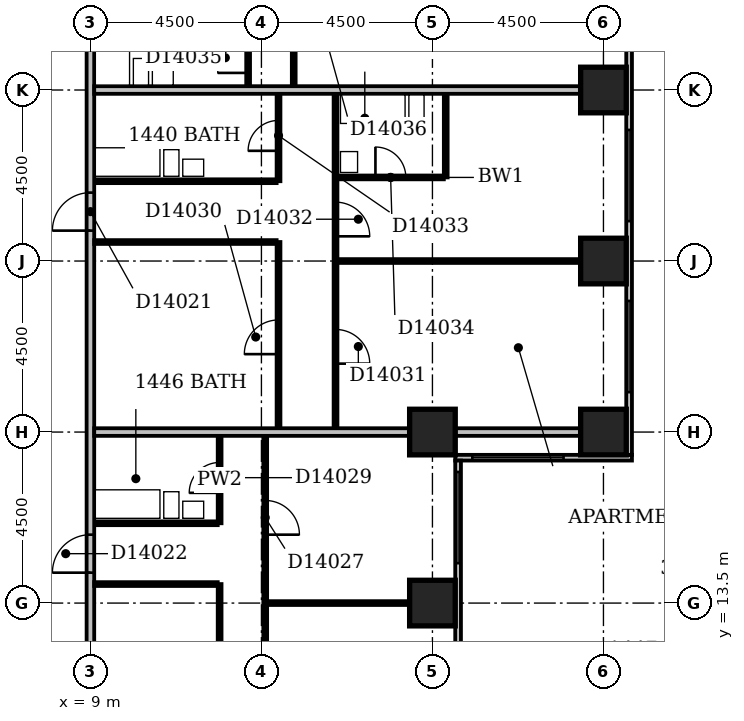
"""IFC4 building model, lengths in metres.
Left out: names, types, materials, properties, quantities, classifications, styles, units other than length and angle.
Written with IfcOpenShell. Run it as: python <this file> out.ifc"""

import sys

from ifc_helpers import new_model, si_unit, direction, frame, frame_2d, origin, origin_2d, place, context, subcontext, project, spatial, rectangle, extrude, element, fill, save


model = new_model("IFC4")
c1 = context("Model", 3, precision=1e-05, world=origin(), true_north=direction((0.0, 1.0)))
c2 = subcontext(c1, "Body", "Model", "MODEL_VIEW")
j1 = project(units=[si_unit("LENGTHUNIT", "METRE"), si_unit("PLANEANGLEUNIT", "RADIAN")], contexts=[c1])
p1 = place(None, origin())
s1 = spatial("IfcSite", under=j1, at=p1, CompositionType="ELEMENT")
p2 = place(p1, origin())
s2 = spatial("IfcBuilding", under=s1, at=p2, CompositionType="ELEMENT")
p3 = place(p2, frame((0.0, 0.0, 61.4)))
s3 = spatial("IfcBuildingStorey", under=s2, at=p3, CompositionType="ELEMENT", Elevation=61.4)
for number, where, z_axis, x_axis in (
    (1, (18.0, 13.5, -0.3), (0.0, 0.0, 1.0), (1.0, 0.0, 0.0)),
    (2, (18.0, 18.0, -0.3), (0.0, 0.0, 1.0), (1.0, 0.0, 0.0)),
    (3, (22.5, 18.0, -0.3), (0.0, 0.0, 1.0), (1.0, 0.0, 0.0)),
    (4, (22.5, 22.5, -0.3), (0.0, 0.0, 1.0), (1.0, 0.0, 0.0)),
    (5, (22.5, 27.0, -0.3), (0.0, 0.0, 1.0), (1.0, 0.0, 0.0)),
):
    element("IfcColumn", number, at=place(p3, frame(where, z_axis=z_axis, x_axis=x_axis)), inside=s3, PredefinedType="COLUMN", context=c2, shape_type="SweptSolid", body=[
        extrude(rectangle(XDim=1.2, YDim=1.2, at=origin_2d()), origin(), (0.0, 0.0, 1.0), 3.6),
    ])
p4 = place(p3, frame((18.675, 8.4, 0.0), z_axis=(0.0, 0.0, 1.0), x_axis=(0.0, 1.0, 0.0)))
e6 = element("IfcWall", 6, at=p4, inside=s3, PredefinedType="STANDARD", context=c2, shape_type="SweptSolid", body=[
    extrude(rectangle(XDim=8.85, YDim=0.15, at=frame_2d((4.425, 0.0))), origin(), (0.0, 0.0, 1.0), 2.7),
])
p5 = place(p4, frame((1.65, 0.0, 0.6)))
e7 = element("IfcOpeningElement", 7, at=p5, cuts=e6, PredefinedType="OPENING", context=c2, shape_type="SweptSolid", body=[
    extrude(rectangle(XDim=2.4, YDim=1.8, at=frame_2d((1.2, 0.9))), frame((0.0, 0.087, 0.0), z_axis=(0.0, -1.0, 0.0), x_axis=(1.0, 0.0, 0.0)), (0.0, 0.0, 1.0), 0.174),
])
p6 = place(p4, frame((6.15, 0.0, 0.6)))
e8 = element("IfcOpeningElement", 8, at=p6, cuts=e6, PredefinedType="OPENING", context=c2, shape_type="SweptSolid", body=[
    extrude(rectangle(XDim=2.4, YDim=1.8, at=frame_2d((1.2, 0.9))), frame((0.0, 0.087, 0.0), z_axis=(0.0, -1.0, 0.0), x_axis=(1.0, 0.0, 0.0)), (0.0, 0.0, 1.0), 0.174),
])
p7 = place(p3, frame((18.6, 17.325, 0.0), z_axis=(0.0, 0.0, 1.0), x_axis=(1.0, 0.0, 0.0)))
e9 = element("IfcWall", 9, at=p7, inside=s3, PredefinedType="STANDARD", context=c2, shape_type="SweptSolid", body=[
    extrude(rectangle(XDim=4.65, YDim=0.15, at=frame_2d((2.325, 0.0))), origin(), (0.0, 0.0, 1.0), 2.7),
])
p8 = place(p7, frame((0.45, 0.0, 0.6)))
e10 = element("IfcOpeningElement", 10, at=p8, cuts=e9, PredefinedType="OPENING", context=c2, shape_type="SweptSolid", body=[
    extrude(rectangle(XDim=2.4, YDim=1.8, at=frame_2d((1.2, 0.9))), frame((0.0, 0.087, 0.0), z_axis=(0.0, -1.0, 0.0), x_axis=(1.0, 0.0, 0.0)), (0.0, 0.0, 1.0), 0.174),
])
p9 = place(p3, frame((23.175, 17.4, 0.0), z_axis=(0.0, 0.0, 1.0), x_axis=(0.0, 1.0, 0.0)))
e11 = element("IfcWall", 11, at=p9, inside=s3, PredefinedType="STANDARD", context=c2, shape_type="SweptSolid", body=[
    extrude(rectangle(XDim=17.85, YDim=0.15, at=frame_2d((8.925, 0.0))), origin(), (0.0, 0.0, 1.0), 2.7),
])
p10 = place(p9, frame((1.65, 0.0, 0.6)))
e12 = element("IfcOpeningElement", 12, at=p10, cuts=e11, PredefinedType="OPENING", context=c2, shape_type="SweptSolid", body=[
    extrude(rectangle(XDim=2.4, YDim=1.8, at=frame_2d((1.2, 0.9))), frame((0.0, 0.087, 0.0), z_axis=(0.0, -1.0, 0.0), x_axis=(1.0, 0.0, 0.0)), (0.0, 0.0, 1.0), 0.174),
])
p11 = place(p9, frame((6.15, 0.0, 0.6)))
e13 = element("IfcOpeningElement", 13, at=p11, cuts=e11, PredefinedType="OPENING", context=c2, shape_type="SweptSolid", body=[
    extrude(rectangle(XDim=2.4, YDim=1.8, at=frame_2d((1.2, 0.9))), frame((0.0, 0.087, 0.0), z_axis=(0.0, -1.0, 0.0), x_axis=(1.0, 0.0, 0.0)), (0.0, 0.0, 1.0), 0.174),
])
p12 = place(p9, frame((11.961, 0.0, 0.6)))
e14 = element("IfcOpeningElement", 14, at=p12, cuts=e11, PredefinedType="OPENING", context=c2, shape_type="SweptSolid", body=[
    extrude(rectangle(XDim=1.2, YDim=1.8, at=frame_2d((0.6, 0.9))), frame((0.0, 0.087, 0.0), z_axis=(0.0, -1.0, 0.0), x_axis=(1.0, 0.0, 0.0)), (0.0, 0.0, 1.0), 0.174),
])
p13 = place(p9, frame((15.15, 0.0, 0.6)))
e15 = element("IfcOpeningElement", 15, at=p13, cuts=e11, PredefinedType="OPENING", context=c2, shape_type="SweptSolid", body=[
    extrude(rectangle(XDim=2.4, YDim=1.8, at=frame_2d((1.2, 0.9))), frame((0.0, 0.087, 0.0), z_axis=(0.0, -1.0, 0.0), x_axis=(1.0, 0.0, 0.0)), (0.0, 0.0, 1.0), 0.174),
])
p14 = place(p3, frame((9.0, 5.0, 0.0), z_axis=(0.0, 0.0, 1.0), x_axis=(0.0, 1.0, 0.0)))
e16 = element("IfcWall", 16, at=p14, inside=s3, PredefinedType="PARTITIONING", context=c2, shape_type="SweptSolid", body=[
    extrude(rectangle(XDim=44.5, YDim=0.2, at=frame_2d((22.25, 0.0))), origin(), (0.0, 0.0, 1.0), 3.3),
])
p15 = place(p14, frame((28.05, 0.0, 0.0)))
e17 = element("IfcOpeningElement", 17, at=p15, cuts=e16, PredefinedType="OPENING", context=c2, shape_type="SweptSolid", body=[
    extrude(rectangle(XDim=1.0, YDim=2.1, at=frame_2d((0.5, 1.05))), frame((0.0, 0.112, 0.0), z_axis=(0.0, -1.0, 0.0), x_axis=(1.0, 0.0, 0.0)), (0.0, 0.0, 1.0), 0.224),
])
p16 = place(p14, frame((23.95, 0.0, 0.0)))
e18 = element("IfcOpeningElement", 18, at=p16, cuts=e16, PredefinedType="OPENING", context=c2, shape_type="SweptSolid", body=[
    extrude(rectangle(XDim=1.0, YDim=2.1, at=frame_2d((0.5, 1.05))), frame((0.0, 0.112, 0.0), z_axis=(0.0, -1.0, 0.0), x_axis=(1.0, 0.0, 0.0)), (0.0, 0.0, 1.0), 0.224),
])
p17 = place(p14, frame((18.3, 0.0, 0.0)))
e19 = element("IfcOpeningElement", 19, at=p17, cuts=e16, PredefinedType="OPENING", context=c2, shape_type="SweptSolid", body=[
    extrude(rectangle(XDim=1.0, YDim=2.1, at=frame_2d((0.5, 1.05))), frame((0.0, 0.112, 0.0), z_axis=(0.0, -1.0, 0.0), x_axis=(1.0, 0.0, 0.0)), (0.0, 0.0, 1.0), 0.224),
])
p18 = place(p14, frame((9.3, 0.0, 0.0)))
e20 = element("IfcOpeningElement", 20, at=p18, cuts=e16, PredefinedType="OPENING", context=c2, shape_type="SweptSolid", body=[
    extrude(rectangle(XDim=1.0, YDim=2.1, at=frame_2d((0.5, 1.05))), frame((0.0, 0.112, 0.0), z_axis=(0.0, -1.0, 0.0), x_axis=(1.0, 0.0, 0.0)), (0.0, 0.0, 1.0), 0.224),
])
p19 = place(p14, frame((32.75, 0.0, 0.0)))
e21 = element("IfcOpeningElement", 21, at=p19, cuts=e16, PredefinedType="OPENING", context=c2, shape_type="SweptSolid", body=[
    extrude(rectangle(XDim=0.9, YDim=2.1, at=frame_2d((0.45, 1.05))), frame((0.0, 0.112, 0.0), z_axis=(0.0, -1.0, 0.0), x_axis=(1.0, 0.0, 0.0)), (0.0, 0.0, 1.0), 0.224),
])
p20 = place(p14, frame((1.5, 0.0, 0.0)))
e22 = element("IfcOpeningElement", 22, at=p20, cuts=e16, PredefinedType="OPENING", context=c2, shape_type="SweptSolid", body=[
    extrude(rectangle(XDim=0.9, YDim=2.1, at=frame_2d((0.45, 1.05))), frame((0.0, 0.112, 0.0), z_axis=(0.0, -1.0, 0.0), x_axis=(1.0, 0.0, 0.0)), (0.0, 0.0, 1.0), 0.224),
])
p21 = place(p3, frame((12.4, 9.1, 0.0), z_axis=(0.0, 0.0, 1.0), x_axis=(0.0, 1.0, 0.0)))
e23 = element("IfcWall", 23, at=p21, inside=s3, PredefinedType="PARTITIONING", context=c2, shape_type="SweptSolid", body=[
    extrude(rectangle(XDim=4.9, YDim=0.1, at=frame_2d((2.45, 0.0))), origin(), (0.0, 0.0, 1.0), 3.3),
])
p22 = place(p21, frame((1.95, 0.0, 0.0)))
e24 = element("IfcOpeningElement", 24, at=p22, cuts=e23, PredefinedType="OPENING", context=c2, shape_type="SweptSolid", body=[
    extrude(rectangle(XDim=0.9, YDim=2.1, at=frame_2d((0.45, 1.05))), frame((0.0, 0.062, 0.0), z_axis=(0.0, -1.0, 0.0), x_axis=(1.0, 0.0, 0.0)), (0.0, 0.0, 1.0), 0.124),
])
p23 = place(p3, frame((13.6, 9.6, 0.0), z_axis=(0.0, 0.0, 1.0), x_axis=(0.0, 1.0, 0.0)))
e25 = element("IfcWall", 25, at=p23, inside=s3, PredefinedType="PARTITIONING", context=c2, shape_type="SweptSolid", body=[
    extrude(rectangle(XDim=8.3, YDim=0.1, at=frame_2d((4.15, 0.0))), origin(), (0.0, 0.0, 1.0), 3.3),
])
p24 = place(p23, frame((1.2, 0.0, 0.0)))
e26 = element("IfcOpeningElement", 26, at=p24, cuts=e25, PredefinedType="OPENING", context=c2, shape_type="SweptSolid", body=[
    extrude(rectangle(XDim=0.9, YDim=2.1, at=frame_2d((0.45, 1.05))), frame((0.0, 0.062, 0.0), z_axis=(0.0, -1.0, 0.0), x_axis=(1.0, 0.0, 0.0)), (0.0, 0.0, 1.0), 0.124),
])
p25 = place(p23, frame((5.7, 0.0, 0.0)))
e27 = element("IfcOpeningElement", 27, at=p25, cuts=e25, PredefinedType="OPENING", context=c2, shape_type="SweptSolid", body=[
    extrude(rectangle(XDim=0.9, YDim=2.1, at=frame_2d((0.45, 1.05))), frame((0.0, 0.062, 0.0), z_axis=(0.0, -1.0, 0.0), x_axis=(1.0, 0.0, 0.0)), (0.0, 0.0, 1.0), 0.124),
])
p26 = place(p3, frame((13.65, 13.5, 0.0), z_axis=(0.0, 0.0, 1.0), x_axis=(1.0, 0.0, 0.0)))
e28 = element("IfcWall", 28, at=p26, inside=s3, PredefinedType="PARTITIONING", context=c2, shape_type="SweptSolid", body=[
    extrude(rectangle(XDim=3.75, YDim=0.1, at=frame_2d((1.875, 0.0))), origin(), (0.0, 0.0, 1.0), 3.3),
])
p27 = place(p3, frame((9.1, 14.0, 0.0), z_axis=(0.0, 0.0, 1.0), x_axis=(1.0, 0.0, 0.0)))
e29 = element("IfcWall", 29, at=p27, inside=s3, PredefinedType="PARTITIONING", context=c2, shape_type="SweptSolid", body=[
    extrude(rectangle(XDim=3.25, YDim=0.1, at=frame_2d((1.625, 0.0))), origin(), (0.0, 0.0, 1.0), 3.3),
])
p28 = place(p3, frame((9.1, 15.6, 0.0), z_axis=(0.0, 0.0, 1.0), x_axis=(1.0, 0.0, 0.0)))
e30 = element("IfcWall", 30, at=p28, inside=s3, PredefinedType="PLUMBINGWALL", context=c2, shape_type="SweptSolid", body=[
    extrude(rectangle(XDim=3.25, YDim=0.1, at=frame_2d((1.625, 0.0))), origin(), (0.0, 0.0, 1.0), 3.3),
])
p29 = place(p3, frame((12.4, 15.6, 0.0), z_axis=(0.0, 0.0, 1.0), x_axis=(0.0, 1.0, 0.0)))
e31 = element("IfcWall", 31, at=p29, inside=s3, PredefinedType="PARTITIONING", context=c2, shape_type="SweptSolid", body=[
    extrude(rectangle(XDim=2.3, YDim=0.1, at=frame_2d((1.15, 0.0))), origin(), (0.0, 0.0, 1.0), 3.3),
])
p30 = place(p29, frame((0.8, 0.0, 0.0)))
e32 = element("IfcOpeningElement", 32, at=p30, cuts=e31, PredefinedType="OPENING", context=c2, shape_type="SweptSolid", body=[
    extrude(rectangle(XDim=0.8, YDim=2.1, at=frame_2d((0.4, 1.05))), frame((0.0, 0.062, 0.0), z_axis=(0.0, -1.0, 0.0), x_axis=(1.0, 0.0, 0.0)), (0.0, 0.0, 1.0), 0.124),
])
p31 = place(p3, frame((9.1, 18.0, 0.0), z_axis=(0.0, 0.0, 1.0), x_axis=(1.0, 0.0, 0.0)))
e33 = element("IfcWall", 33, at=p31, inside=s3, PredefinedType="PARTITIONING", context=c2, shape_type="SweptSolid", body=[
    extrude(rectangle(XDim=8.3, YDim=0.2, at=frame_2d((4.15, 0.0))), origin(), (0.0, 0.0, 1.0), 2.6),
])
p32 = place(p3, frame((18.6, 18.0, 0.0), z_axis=(0.0, 0.0, 1.0), x_axis=(1.0, 0.0, 0.0)))
e34 = element("IfcWall", 34, at=p32, inside=s3, PredefinedType="PARTITIONING", context=c2, shape_type="SweptSolid", body=[
    extrude(rectangle(XDim=3.3, YDim=0.2, at=frame_2d((1.65, 0.0))), origin(), (0.0, 0.0, 1.0), 2.7),
])
p33 = place(p3, frame((13.95, 18.1, 0.0), z_axis=(0.0, 0.0, 1.0), x_axis=(0.0, 1.0, 0.0)))
e35 = element("IfcWall", 35, at=p33, inside=s3, PredefinedType="PARTITIONING", context=c2, shape_type="SweptSolid", body=[
    extrude(rectangle(XDim=4.9, YDim=0.1, at=frame_2d((2.45, 0.0))), origin(), (0.0, 0.0, 1.0), 3.3),
])
p34 = place(p33, frame((1.95, 0.0, 0.0)))
e36 = element("IfcOpeningElement", 36, at=p34, cuts=e35, PredefinedType="OPENING", context=c2, shape_type="SweptSolid", body=[
    extrude(rectangle(XDim=0.9, YDim=2.1, at=frame_2d((0.45, 1.05))), frame((0.0, 0.062, 0.0), z_axis=(0.0, -1.0, 0.0), x_axis=(1.0, 0.0, 0.0)), (0.0, 0.0, 1.0), 0.124),
])
p35 = place(p3, frame((15.45, 18.1, 0.0), z_axis=(0.0, 0.0, 1.0), x_axis=(0.0, 1.0, 0.0)))
e37 = element("IfcWall", 37, at=p35, inside=s3, PredefinedType="PARTITIONING", context=c2, shape_type="SweptSolid", body=[
    extrude(rectangle(XDim=8.8, YDim=0.1, at=frame_2d((4.4, 0.0))), origin(), (0.0, 0.0, 1.0), 3.3),
])
p36 = place(p35, frame((1.7, 0.0, 0.0)))
e38 = element("IfcOpeningElement", 38, at=p36, cuts=e37, PredefinedType="OPENING", context=c2, shape_type="SweptSolid", body=[
    extrude(rectangle(XDim=0.9, YDim=2.1, at=frame_2d((0.45, 1.05))), frame((0.0, 0.062, 0.0), z_axis=(0.0, -1.0, 0.0), x_axis=(1.0, 0.0, 0.0)), (0.0, 0.0, 1.0), 0.124),
])
p37 = place(p35, frame((5.05, 0.0, 0.0)))
e39 = element("IfcOpeningElement", 39, at=p37, cuts=e37, PredefinedType="OPENING", context=c2, shape_type="SweptSolid", body=[
    extrude(rectangle(XDim=0.9, YDim=2.1, at=frame_2d((0.45, 1.05))), frame((0.0, 0.062, 0.0), z_axis=(0.0, -1.0, 0.0), x_axis=(1.0, 0.0, 0.0)), (0.0, 0.0, 1.0), 0.124),
])
p38 = place(p3, frame((15.5, 22.5, 0.0), z_axis=(0.0, 0.0, 1.0), x_axis=(1.0, 0.0, 0.0)))
e40 = element("IfcWall", 40, at=p38, inside=s3, PredefinedType="PARTITIONING", context=c2, shape_type="SweptSolid", body=[
    extrude(rectangle(XDim=6.4, YDim=0.1, at=frame_2d((3.2, 0.0))), origin(), (0.0, 0.0, 1.0), 3.3),
])
p39 = place(p3, frame((9.1, 23.0, 0.0), z_axis=(0.0, 0.0, 1.0), x_axis=(1.0, 0.0, 0.0)))
e41 = element("IfcWall", 41, at=p39, inside=s3, PredefinedType="PARTITIONING", context=c2, shape_type="SweptSolid", body=[
    extrude(rectangle(XDim=4.8, YDim=0.1, at=frame_2d((2.4, 0.0))), origin(), (0.0, 0.0, 1.0), 3.3),
])
p40 = place(p3, frame((9.1, 24.6, 0.0), z_axis=(0.0, 0.0, 1.0), x_axis=(1.0, 0.0, 0.0)))
e42 = element("IfcWall", 42, at=p40, inside=s3, PredefinedType="PLUMBINGWALL", context=c2, shape_type="SweptSolid", body=[
    extrude(rectangle(XDim=4.8, YDim=0.1, at=frame_2d((2.4, 0.0))), origin(), (0.0, 0.0, 1.0), 3.3),
])
p41 = place(p3, frame((13.95, 24.6, 0.0), z_axis=(0.0, 0.0, 1.0), x_axis=(0.0, 1.0, 0.0)))
e43 = element("IfcWall", 43, at=p41, inside=s3, PredefinedType="PARTITIONING", context=c2, shape_type="SweptSolid", body=[
    extrude(rectangle(XDim=2.3, YDim=0.1, at=frame_2d((1.15, 0.0))), origin(), (0.0, 0.0, 1.0), 3.3),
])
p42 = place(p41, frame((0.8, 0.0, 0.0)))
e44 = element("IfcOpeningElement", 44, at=p42, cuts=e43, PredefinedType="OPENING", context=c2, shape_type="SweptSolid", body=[
    extrude(rectangle(XDim=0.8, YDim=2.1, at=frame_2d((0.4, 1.05))), frame((0.0, 0.062, 0.0), z_axis=(0.0, -1.0, 0.0), x_axis=(1.0, 0.0, 0.0)), (0.0, 0.0, 1.0), 0.124),
])
p43 = place(p3, frame((15.5, 24.7, 0.0), z_axis=(0.0, 0.0, 1.0), x_axis=(1.0, 0.0, 0.0)))
e45 = element("IfcWall", 45, at=p43, inside=s3, PredefinedType="PLUMBINGWALL", context=c2, shape_type="SweptSolid", body=[
    extrude(rectangle(XDim=2.8, YDim=0.1, at=frame_2d((1.4, 0.0))), origin(), (0.0, 0.0, 1.0), 3.3),
])
p44 = place(p43, frame((1.0, 0.0, 0.0)))
e46 = element("IfcOpeningElement", 46, at=p44, cuts=e45, PredefinedType="OPENING", context=c2, shape_type="SweptSolid", body=[
    extrude(rectangle(XDim=0.8, YDim=2.1, at=frame_2d((0.4, 1.05))), frame((0.0, 0.062, 0.0), z_axis=(0.0, -1.0, 0.0), x_axis=(1.0, 0.0, 0.0)), (0.0, 0.0, 1.0), 0.124),
])
p45 = place(p3, frame((18.35, 24.7, 0.0), z_axis=(0.0, 0.0, 1.0), x_axis=(0.0, 1.0, 0.0)))
e47 = element("IfcWall", 47, at=p45, inside=s3, PredefinedType="PLUMBINGWALL", context=c2, shape_type="SweptSolid", body=[
    extrude(rectangle(XDim=2.2, YDim=0.1, at=frame_2d((1.1, 0.0))), origin(), (0.0, 0.0, 1.0), 3.3),
])
p46 = place(p3, frame((9.1, 27.0, 0.0), z_axis=(0.0, 0.0, 1.0), x_axis=(1.0, 0.0, 0.0)))
e48 = element("IfcWall", 48, at=p46, inside=s3, PredefinedType="PARTITIONING", context=c2, shape_type="SweptSolid", body=[
    extrude(rectangle(XDim=12.8, YDim=0.2, at=frame_2d((6.4, 0.0))), origin(), (0.0, 0.0, 1.0), 2.7),
])
p47 = place(p3, frame((13.15, 27.1, 0.0), z_axis=(0.0, 0.0, 1.0), x_axis=(0.0, 1.0, 0.0)))
e49 = element("IfcWall", 49, at=p47, inside=s3, PredefinedType="PARTITIONING", context=c2, shape_type="SweptSolid", body=[
    extrude(rectangle(XDim=1.6, YDim=0.1, at=frame_2d((0.8, 0.0))), origin(), (0.0, 0.0, 1.0), 3.3),
])
p48 = place(p47, frame((0.35, 0.0, 0.0)))
e50 = element("IfcOpeningElement", 50, at=p48, cuts=e49, PredefinedType="OPENING", context=c2, shape_type="SweptSolid", body=[
    extrude(rectangle(XDim=0.8, YDim=2.1, at=frame_2d((0.4, 1.05))), frame((0.0, 0.062, 0.0), z_axis=(0.0, -1.0, 0.0), x_axis=(1.0, 0.0, 0.0)), (0.0, 0.0, 1.0), 0.124),
])
p49 = place(p3, frame((14.35, 27.1, 0.0), z_axis=(0.0, 0.0, 1.0), x_axis=(0.0, 1.0, 0.0)))
e51 = element("IfcWall", 51, at=p49, inside=s3, PredefinedType="PARTITIONING", context=c2, shape_type="SweptSolid", body=[
    extrude(rectangle(XDim=4.3, YDim=0.1, at=frame_2d((2.15, 0.0))), origin(), (0.0, 0.0, 1.0), 3.3),
])
p50 = place(p49, frame((1.7, 0.0, 0.0)))
e52 = element("IfcOpeningElement", 52, at=p50, cuts=e51, PredefinedType="OPENING", context=c2, shape_type="SweptSolid", body=[
    extrude(rectangle(XDim=0.9, YDim=2.1, at=frame_2d((0.45, 1.05))), frame((0.0, 0.062, 0.0), z_axis=(0.0, -1.0, 0.0), x_axis=(1.0, 0.0, 0.0)), (0.0, 0.0, 1.0), 0.124),
])
p51 = place(p6, origin())
e53 = element("IfcWindow", 53, at=p51, inside=s3, PartitioningType="SINGLE_PANEL", PredefinedType="WINDOW", context=c2, shape_type="SweptSolid", body=[
    extrude(rectangle(XDim=2.4, YDim=1.8, at=frame_2d((1.2, 0.9))), frame((0.0, 0.03, 0.0), z_axis=(0.0, -1.0, 0.0), x_axis=(1.0, 0.0, 0.0)), (0.0, 0.0, 1.0), 0.06),
])
fill(e8, e53)
p52 = place(p8, origin())
e54 = element("IfcWindow", 54, at=p52, inside=s3, PartitioningType="SINGLE_PANEL", PredefinedType="WINDOW", context=c2, shape_type="SweptSolid", body=[
    extrude(rectangle(XDim=2.4, YDim=1.8, at=frame_2d((1.2, 0.9))), frame((0.0, 0.03, 0.0), z_axis=(0.0, -1.0, 0.0), x_axis=(1.0, 0.0, 0.0)), (0.0, 0.0, 1.0), 0.06),
])
fill(e10, e54)
p53 = place(p10, origin())
e55 = element("IfcWindow", 55, at=p53, inside=s3, PartitioningType="SINGLE_PANEL", PredefinedType="WINDOW", context=c2, shape_type="SweptSolid", body=[
    extrude(rectangle(XDim=2.4, YDim=1.8, at=frame_2d((1.2, 0.9))), frame((0.0, 0.03, 0.0), z_axis=(0.0, -1.0, 0.0), x_axis=(1.0, 0.0, 0.0)), (0.0, 0.0, 1.0), 0.06),
])
fill(e12, e55)
p54 = place(p11, origin())
e56 = element("IfcWindow", 56, at=p54, inside=s3, PartitioningType="SINGLE_PANEL", PredefinedType="WINDOW", context=c2, shape_type="SweptSolid", body=[
    extrude(rectangle(XDim=2.4, YDim=1.8, at=frame_2d((1.2, 0.9))), frame((0.0, 0.03, 0.0), z_axis=(0.0, -1.0, 0.0), x_axis=(1.0, 0.0, 0.0)), (0.0, 0.0, 1.0), 0.06),
])
fill(e13, e56)
p55 = place(p17, origin())
e57 = element("IfcDoor", 57, at=p55, inside=s3, OperationType="SINGLE_SWING_LEFT", PredefinedType="DOOR", context=c2, shape_type="SweptSolid", body=[
    extrude(rectangle(XDim=1.0, YDim=2.1, at=frame_2d((0.5, 1.05))), frame((0.0, 0.025, 0.0), z_axis=(0.0, -1.0, 0.0), x_axis=(1.0, 0.0, 0.0)), (0.0, 0.0, 1.0), 0.05),
])
fill(e19, e57)
p56 = place(p18, origin())
e58 = element("IfcDoor", 58, at=p56, inside=s3, OperationType="SINGLE_SWING_LEFT", PredefinedType="DOOR", context=c2, shape_type="SweptSolid", body=[
    extrude(rectangle(XDim=1.0, YDim=2.1, at=frame_2d((0.5, 1.05))), frame((0.0, 0.025, 0.0), z_axis=(0.0, -1.0, 0.0), x_axis=(1.0, 0.0, 0.0)), (0.0, 0.0, 1.0), 0.05),
])
fill(e20, e58)
p57 = place(p25, frame((0.9, 0.0, 0.0), z_axis=(0.0, 0.0, 1.0), x_axis=(-1.0, 0.0, 0.0)))
e59 = element("IfcDoor", 59, at=p57, inside=s3, OperationType="SINGLE_SWING_RIGHT", PredefinedType="DOOR", context=c2, shape_type="SweptSolid", body=[
    extrude(rectangle(XDim=0.9, YDim=2.1, at=frame_2d((0.45, 1.05))), frame((0.0, 0.025, 0.0), z_axis=(0.0, -1.0, 0.0), x_axis=(1.0, 0.0, 0.0)), (0.0, 0.0, 1.0), 0.05),
])
fill(e27, e59)
p58 = place(p30, origin())
e60 = element("IfcDoor", 60, at=p58, inside=s3, OperationType="SINGLE_SWING_LEFT", PredefinedType="DOOR", context=c2, shape_type="SweptSolid", body=[
    extrude(rectangle(XDim=0.8, YDim=2.1, at=frame_2d((0.4, 1.05))), frame((0.0, 0.025, 0.0), z_axis=(0.0, -1.0, 0.0), x_axis=(1.0, 0.0, 0.0)), (0.0, 0.0, 1.0), 0.05),
])
fill(e32, e60)
p59 = place(p34, origin())
e61 = element("IfcDoor", 61, at=p59, inside=s3, OperationType="SINGLE_SWING_LEFT", PredefinedType="DOOR", context=c2, shape_type="SweptSolid", body=[
    extrude(rectangle(XDim=0.9, YDim=2.1, at=frame_2d((0.45, 1.05))), frame((0.0, 0.025, 0.0), z_axis=(0.0, -1.0, 0.0), x_axis=(1.0, 0.0, 0.0)), (0.0, 0.0, 1.0), 0.05),
])
fill(e36, e61)
p60 = place(p36, frame((0.9, 0.0, 0.0), z_axis=(0.0, 0.0, 1.0), x_axis=(-1.0, 0.0, 0.0)))
e62 = element("IfcDoor", 62, at=p60, inside=s3, OperationType="SINGLE_SWING_RIGHT", PredefinedType="DOOR", context=c2, shape_type="SweptSolid", body=[
    extrude(rectangle(XDim=0.9, YDim=2.1, at=frame_2d((0.45, 1.05))), frame((0.0, 0.025, 0.0), z_axis=(0.0, -1.0, 0.0), x_axis=(1.0, 0.0, 0.0)), (0.0, 0.0, 1.0), 0.05),
])
fill(e38, e62)
p61 = place(p37, frame((0.9, 0.0, 0.0), z_axis=(0.0, 0.0, 1.0), x_axis=(-1.0, 0.0, 0.0)))
e63 = element("IfcDoor", 63, at=p61, inside=s3, OperationType="SINGLE_SWING_RIGHT", PredefinedType="DOOR", context=c2, shape_type="SweptSolid", body=[
    extrude(rectangle(XDim=0.9, YDim=2.1, at=frame_2d((0.45, 1.05))), frame((0.0, 0.025, 0.0), z_axis=(0.0, -1.0, 0.0), x_axis=(1.0, 0.0, 0.0)), (0.0, 0.0, 1.0), 0.05),
])
fill(e39, e63)
p62 = place(p42, origin())
e64 = element("IfcDoor", 64, at=p62, inside=s3, OperationType="SINGLE_SWING_LEFT", PredefinedType="DOOR", context=c2, shape_type="SweptSolid", body=[
    extrude(rectangle(XDim=0.8, YDim=2.1, at=frame_2d((0.4, 1.05))), frame((0.0, 0.025, 0.0), z_axis=(0.0, -1.0, 0.0), x_axis=(1.0, 0.0, 0.0)), (0.0, 0.0, 1.0), 0.05),
])
fill(e44, e64)
p63 = place(p44, origin())
e65 = element("IfcDoor", 65, at=p63, inside=s3, OperationType="SINGLE_SWING_LEFT", PredefinedType="DOOR", context=c2, shape_type="SweptSolid", body=[
    extrude(rectangle(XDim=0.8, YDim=2.1, at=frame_2d((0.4, 1.05))), frame((0.0, 0.025, 0.0), z_axis=(0.0, -1.0, 0.0), x_axis=(1.0, 0.0, 0.0)), (0.0, 0.0, 1.0), 0.05),
])
fill(e46, e65)
p64 = place(p48, origin())
e66 = element("IfcDoor", 66, at=p64, inside=s3, OperationType="SINGLE_SWING_LEFT", PredefinedType="DOOR", context=c2, shape_type="SweptSolid", body=[
    extrude(rectangle(XDim=0.8, YDim=2.1, at=frame_2d((0.4, 1.05))), frame((0.0, 0.025, 0.0), z_axis=(0.0, -1.0, 0.0), x_axis=(1.0, 0.0, 0.0)), (0.0, 0.0, 1.0), 0.05),
])
fill(e50, e66)
save(model, sys.argv[1])
